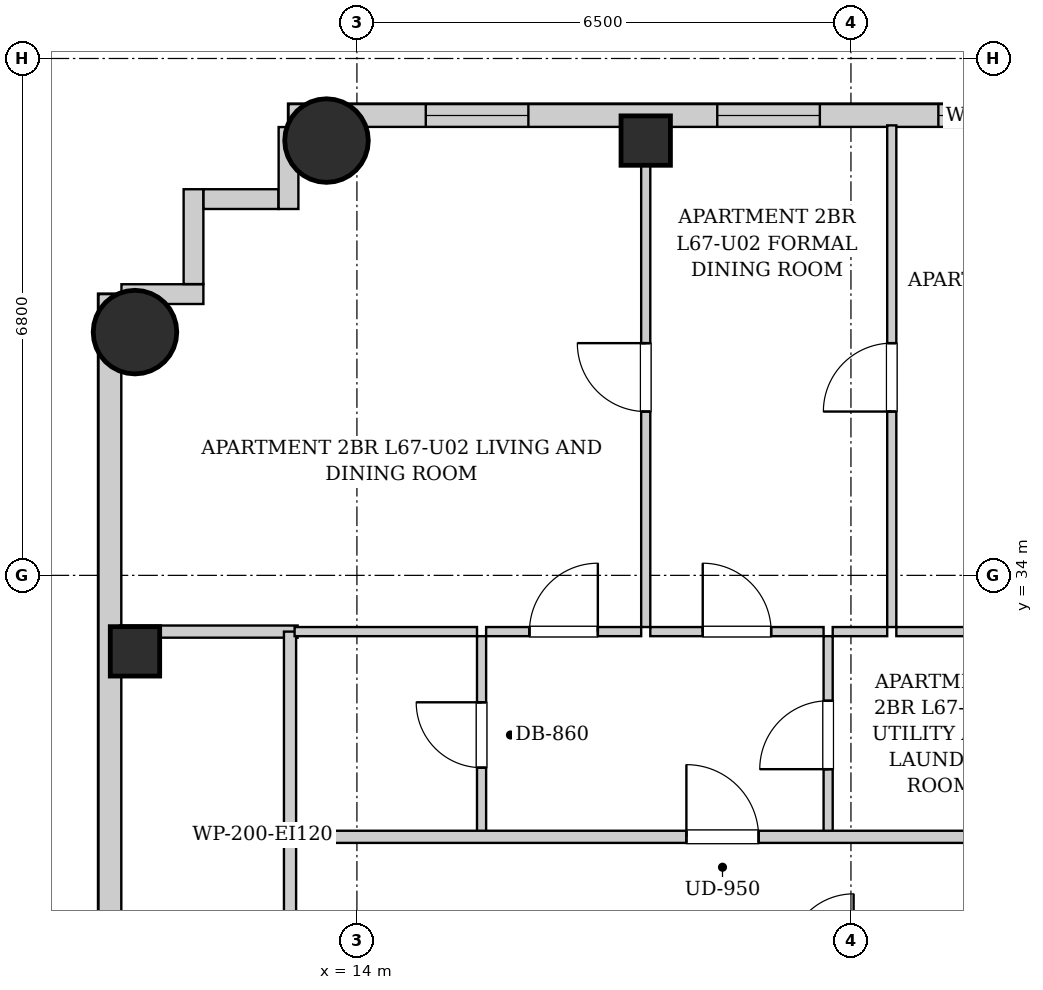
"""IFC4 building model, lengths in metres.
Left out: names, types, materials, properties, quantities, classifications, styles, units other than length and angle.
Written with IfcOpenShell. Run it as: python <this file> out.ifc"""

import sys

from ifc_helpers import new_model, si_unit, direction, frame, frame_2d, origin, origin_2d, place, context, subcontext, project, spatial, rectangle, circle, extrude, element, fill, save


model = new_model("IFC4")
c1 = context("Model", 3, precision=1e-05, world=origin(), true_north=direction((0.0, 1.0)))
c2 = subcontext(c1, "Body", "Model", "MODEL_VIEW")
j1 = project(units=[si_unit("LENGTHUNIT", "METRE"), si_unit("PLANEANGLEUNIT", "RADIAN")], contexts=[c1])
p1 = place(None, origin())
s1 = spatial("IfcSite", under=j1, at=p1, CompositionType="ELEMENT")
p2 = place(p1, origin())
s2 = spatial("IfcBuilding", under=s1, at=p2, CompositionType="ELEMENT")
p3 = place(p2, frame((0.0, 0.0, 230.9)))
s3 = spatial("IfcBuildingStorey", under=s2, at=p3, CompositionType="ELEMENT", Elevation=230.9)
p4 = place(p3, frame((13.6, 39.72, 0.0), z_axis=(0.0, 0.0, 1.0), x_axis=(1.0, 0.0, 0.0)))
e1 = element("IfcColumn", 1, at=p4, inside=s3, PredefinedType="COLUMN", context=c2, shape_type="SweptSolid", body=[
    extrude(circle(Radius=0.55, at=origin_2d()), origin(), (0.0, 0.0, 1.0), 3.4),
])
for number, where, z_axis, x_axis in (
    (2, (17.8, 39.72, 0.0), (0.0, 0.0, 1.0), (1.0, 0.0, 0.0)),
    (3, (11.08, 33.0, 0.0), (0.0, 0.0, 1.0), (1.0, 0.0, 0.0)),
):
    element("IfcColumn", number, at=place(p3, frame(where, z_axis=z_axis, x_axis=x_axis)), inside=s3, PredefinedType="COLUMN", context=c2, shape_type="SweptSolid", body=[
        extrude(rectangle(XDim=0.65, YDim=0.65, at=origin_2d()), origin(), (0.0, 0.0, 1.0), 3.4),
    ])
p5 = place(p3, frame((11.08, 37.2, 0.0), z_axis=(0.0, 0.0, 1.0), x_axis=(1.0, 0.0, 0.0)))
e4 = element("IfcColumn", 4, at=p5, inside=s3, PredefinedType="COLUMN", context=c2, shape_type="SweptSolid", body=[
    extrude(circle(Radius=0.55, at=origin_2d()), origin(), (0.0, 0.0, 1.0), 3.4),
])
p6 = place(p3, frame((13.1, 40.05, 0.0), z_axis=(0.0, 0.0, 1.0), x_axis=(1.0, 0.0, 0.0)))
e5 = element("IfcWall", 5, at=p6, inside=s3, PredefinedType="SOLIDWALL", context=c2, shape_type="SweptSolid", body=[
    extrude(rectangle(XDim=18.8, YDim=0.3, at=frame_2d((9.4, 0.0))), origin(), (0.0, 0.0, 1.0), 3.14),
])
p7 = place(p6, frame((1.806, 0.0, 0.55)))
e6 = element("IfcOpeningElement", 6, at=p7, cuts=e5, PredefinedType="OPENING", context=c2, shape_type="SweptSolid", body=[
    extrude(rectangle(XDim=1.35, YDim=1.2, at=frame_2d((0.675, 0.6))), frame((0.0, 0.16, 0.0), z_axis=(0.0, -1.0, 0.0), x_axis=(1.0, 0.0, 0.0)), (0.0, 0.0, 1.0), 0.32),
])
p8 = place(p6, frame((5.641, 0.0, 0.55)))
e7 = element("IfcOpeningElement", 7, at=p8, cuts=e5, PredefinedType="OPENING", context=c2, shape_type="SweptSolid", body=[
    extrude(rectangle(XDim=1.35, YDim=1.2, at=frame_2d((0.675, 0.6))), frame((0.0, 0.16, 0.0), z_axis=(0.0, -1.0, 0.0), x_axis=(1.0, 0.0, 0.0)), (0.0, 0.0, 1.0), 0.32),
])
p9 = place(p6, frame((8.55, 0.0, 0.55)))
e8 = element("IfcOpeningElement", 8, at=p9, cuts=e5, PredefinedType="OPENING", context=c2, shape_type="SweptSolid", body=[
    extrude(rectangle(XDim=0.85, YDim=1.2, at=frame_2d((0.425, 0.6))), frame((0.0, 0.16, 0.0), z_axis=(0.0, -1.0, 0.0), x_axis=(1.0, 0.0, 0.0)), (0.0, 0.0, 1.0), 0.32),
])
p10 = place(p6, frame((14.4, 0.0, 0.55)))
e9 = element("IfcOpeningElement", 9, at=p10, cuts=e5, PredefinedType="OPENING", context=c2, shape_type="SweptSolid", body=[
    extrude(rectangle(XDim=1.35, YDim=1.2, at=frame_2d((0.675, 0.6))), frame((0.0, 0.16, 0.0), z_axis=(0.0, -1.0, 0.0), x_axis=(1.0, 0.0, 0.0)), (0.0, 0.0, 1.0), 0.32),
])
p11 = place(p3, frame((10.75, 6.3, 0.0), z_axis=(0.0, 0.0, 1.0), x_axis=(0.0, 1.0, 0.0)))
e10 = element("IfcWall", 10, at=p11, inside=s3, PredefinedType="SOLIDWALL", context=c2, shape_type="SweptSolid", body=[
    extrude(rectangle(XDim=31.4, YDim=0.3, at=frame_2d((15.7, 0.0))), origin(), (0.0, 0.0, 1.0), 3.14),
])
p12 = place(p11, frame((1.653, 0.0, 0.55)))
e11 = element("IfcOpeningElement", 11, at=p12, cuts=e10, PredefinedType="OPENING", context=c2, shape_type="SweptSolid", body=[
    extrude(rectangle(XDim=1.35, YDim=1.2, at=frame_2d((0.675, 0.6))), frame((0.0, 0.16, 0.0), z_axis=(0.0, -1.0, 0.0), x_axis=(1.0, 0.0, 0.0)), (0.0, 0.0, 1.0), 0.32),
])
p13 = place(p11, frame((10.367, 0.0, 0.55)))
e12 = element("IfcOpeningElement", 12, at=p13, cuts=e10, PredefinedType="OPENING", context=c2, shape_type="SweptSolid", body=[
    extrude(rectangle(XDim=1.35, YDim=1.2, at=frame_2d((0.675, 0.6))), frame((0.0, 0.16, 0.0), z_axis=(0.0, -1.0, 0.0), x_axis=(1.0, 0.0, 0.0)), (0.0, 0.0, 1.0), 0.32),
])
p14 = place(p11, frame((19.683, 0.0, 0.55)))
e13 = element("IfcOpeningElement", 13, at=p14, cuts=e10, PredefinedType="OPENING", context=c2, shape_type="SweptSolid", body=[
    extrude(rectangle(XDim=1.35, YDim=1.2, at=frame_2d((0.675, 0.6))), frame((0.0, 0.16, 0.0), z_axis=(0.0, -1.0, 0.0), x_axis=(1.0, 0.0, 0.0)), (0.0, 0.0, 1.0), 0.32),
])
p15 = place(p3, frame((10.902, 37.7, 0.0), z_axis=(0.0, 0.0, 1.0), x_axis=(1.0, 0.0, 0.0)))
e14 = element("IfcWall", 14, at=p15, inside=s3, PredefinedType="SOLIDWALL", context=c2, shape_type="SweptSolid", body=[
    extrude(rectangle(XDim=1.078, YDim=0.26, at=frame_2d((0.539, 0.0))), origin(), (0.0, 0.0, 1.0), 3.14),
])
p16 = place(p3, frame((11.85, 37.832, 0.0), z_axis=(0.0, 0.0, 1.0), x_axis=(0.0, 1.0, 0.0)))
e15 = element("IfcWall", 15, at=p16, inside=s3, PredefinedType="SOLIDWALL", context=c2, shape_type="SweptSolid", body=[
    extrude(rectangle(XDim=1.248, YDim=0.26, at=frame_2d((0.624, 0.0))), origin(), (0.0, 0.0, 1.0), 3.14),
])
p17 = place(p3, frame((11.982, 38.95, 0.0), z_axis=(0.0, 0.0, 1.0), x_axis=(1.0, 0.0, 0.0)))
e16 = element("IfcWall", 16, at=p17, inside=s3, PredefinedType="SOLIDWALL", context=c2, shape_type="SweptSolid", body=[
    extrude(rectangle(XDim=0.986, YDim=0.26, at=frame_2d((0.493, 0.0))), origin(), (0.0, 0.0, 1.0), 3.14),
])
p18 = place(p3, frame((13.1, 38.82, 0.0), z_axis=(0.0, 0.0, 1.0), x_axis=(0.0, 1.0, 0.0)))
e17 = element("IfcWall", 17, at=p18, inside=s3, PredefinedType="SOLIDWALL", context=c2, shape_type="SweptSolid", body=[
    extrude(rectangle(XDim=1.078, YDim=0.26, at=frame_2d((0.539, 0.0))), origin(), (0.0, 0.0, 1.0), 3.14),
])
p19 = place(p3, frame((13.12, 28.98, 0.0), z_axis=(0.0, 0.0, 1.0), x_axis=(0.0, 1.0, 0.0)))
e18 = element("IfcWall", 18, at=p19, inside=s3, PredefinedType="PARTITIONING", context=c2, shape_type="SweptSolid", body=[
    extrude(rectangle(XDim=1.58, YDim=0.16, at=frame_2d((0.79, 0.0))), origin(), (0.0, 0.0, 1.0), 3.14),
])
p20 = place(p3, frame((10.88, 33.26, 0.0), z_axis=(0.0, 0.0, 1.0), x_axis=(1.0, 0.0, 0.0)))
e19 = element("IfcWall", 19, at=p20, inside=s3, PredefinedType="PARTITIONING", context=c2, shape_type="SweptSolid", body=[
    extrude(rectangle(XDim=2.34, YDim=0.16, at=frame_2d((1.17, 0.0))), origin(), (0.0, 0.0, 1.0), 3.14),
])
p21 = place(p3, frame((13.12, 30.6, 0.0), z_axis=(0.0, 0.0, 1.0), x_axis=(0.0, 1.0, 0.0)))
e20 = element("IfcWall", 20, at=p21, inside=s3, PredefinedType="PARTITIONING", context=c2, shape_type="SweptSolid", body=[
    extrude(rectangle(XDim=2.66, YDim=0.16, at=frame_2d((1.33, 0.0))), origin(), (0.0, 0.0, 1.0), 3.14),
])
p22 = place(p3, frame((15.64, 30.6, 0.0), z_axis=(0.0, 0.0, 1.0), x_axis=(0.0, 1.0, 0.0)))
e21 = element("IfcWall", 21, at=p22, inside=s3, PredefinedType="PARTITIONING", context=c2, shape_type="SweptSolid", body=[
    extrude(rectangle(XDim=2.6, YDim=0.12, at=frame_2d((1.3, 0.0))), origin(), (0.0, 0.0, 1.0), 3.14),
])
p23 = place(p22, frame((0.87, 0.0, 0.0)))
e22 = element("IfcOpeningElement", 22, at=p23, cuts=e21, PredefinedType="OPENING", context=c2, shape_type="SweptSolid", body=[
    extrude(rectangle(XDim=0.86, YDim=2.05, at=frame_2d((0.43, 1.025))), frame((0.0, 0.07, 0.0), z_axis=(0.0, -1.0, 0.0), x_axis=(1.0, 0.0, 0.0)), (0.0, 0.0, 1.0), 0.14),
])
p24 = place(p3, frame((13.18, 33.26, 0.0), z_axis=(0.0, 0.0, 1.0), x_axis=(1.0, 0.0, 0.0)))
e23 = element("IfcWall", 23, at=p24, inside=s3, PredefinedType="PARTITIONING", context=c2, shape_type="SweptSolid", body=[
    extrude(rectangle(XDim=2.4, YDim=0.12, at=frame_2d((1.2, 0.0))), origin(), (0.0, 0.0, 1.0), 3.14),
])
p25 = place(p3, frame((20.2, 30.6, 0.0), z_axis=(0.0, 0.0, 1.0), x_axis=(0.0, 1.0, 0.0)))
e24 = element("IfcWall", 24, at=p25, inside=s3, PredefinedType="PARTITIONING", context=c2, shape_type="SweptSolid", body=[
    extrude(rectangle(XDim=2.6, YDim=0.12, at=frame_2d((1.3, 0.0))), origin(), (0.0, 0.0, 1.0), 3.14),
])
p26 = place(p25, frame((0.85, 0.0, 0.0)))
e25 = element("IfcOpeningElement", 25, at=p26, cuts=e24, PredefinedType="OPENING", context=c2, shape_type="SweptSolid", body=[
    extrude(rectangle(XDim=0.9, YDim=2.05, at=frame_2d((0.45, 1.025))), frame((0.0, 0.07, 0.0), z_axis=(0.0, -1.0, 0.0), x_axis=(1.0, 0.0, 0.0)), (0.0, 0.0, 1.0), 0.14),
])
p27 = place(p3, frame((15.7, 33.26, 0.0), z_axis=(0.0, 0.0, 1.0), x_axis=(1.0, 0.0, 0.0)))
e26 = element("IfcWall", 26, at=p27, inside=s3, PredefinedType="PARTITIONING", context=c2, shape_type="SweptSolid", body=[
    extrude(rectangle(XDim=2.04, YDim=0.12, at=frame_2d((1.02, 0.0))), origin(), (0.0, 0.0, 1.0), 3.14),
])
p28 = place(p27, frame((0.57, 0.0, 0.0)))
e27 = element("IfcOpeningElement", 27, at=p28, cuts=e26, PredefinedType="OPENING", context=c2, shape_type="SweptSolid", body=[
    extrude(rectangle(XDim=0.9, YDim=2.05, at=frame_2d((0.45, 1.025))), frame((0.0, 0.07, 0.0), z_axis=(0.0, -1.0, 0.0), x_axis=(1.0, 0.0, 0.0)), (0.0, 0.0, 1.0), 0.14),
])
p29 = place(p3, frame((17.86, 33.26, 0.0), z_axis=(0.0, 0.0, 1.0), x_axis=(1.0, 0.0, 0.0)))
e28 = element("IfcWall", 28, at=p29, inside=s3, PredefinedType="PARTITIONING", context=c2, shape_type="SweptSolid", body=[
    extrude(rectangle(XDim=2.28, YDim=0.12, at=frame_2d((1.14, 0.0))), origin(), (0.0, 0.0, 1.0), 3.14),
])
p30 = place(p29, frame((0.69, 0.0, 0.0)))
e29 = element("IfcOpeningElement", 29, at=p30, cuts=e28, PredefinedType="OPENING", context=c2, shape_type="SweptSolid", body=[
    extrude(rectangle(XDim=0.9, YDim=2.05, at=frame_2d((0.45, 1.025))), frame((0.0, 0.07, 0.0), z_axis=(0.0, -1.0, 0.0), x_axis=(1.0, 0.0, 0.0)), (0.0, 0.0, 1.0), 0.14),
])
p31 = place(p3, frame((20.26, 33.26, 0.0), z_axis=(0.0, 0.0, 1.0), x_axis=(1.0, 0.0, 0.0)))
e30 = element("IfcWall", 30, at=p31, inside=s3, PredefinedType="PARTITIONING", context=c2, shape_type="SweptSolid", body=[
    extrude(rectangle(XDim=0.717, YDim=0.12, at=frame_2d((0.358, 0.0))), origin(), (0.0, 0.0, 1.0), 3.14),
])
p32 = place(p3, frame((21.097, 33.26, 0.0), z_axis=(0.0, 0.0, 1.0), x_axis=(1.0, 0.0, 0.0)))
e31 = element("IfcWall", 31, at=p32, inside=s3, PredefinedType="PARTITIONING", context=c2, shape_type="SweptSolid", body=[
    extrude(rectangle(XDim=2.763, YDim=0.12, at=frame_2d((1.382, 0.0))), origin(), (0.0, 0.0, 1.0), 3.14),
])
p33 = place(p32, frame((0.931, 0.0, 0.0)))
e32 = element("IfcOpeningElement", 32, at=p33, cuts=e31, PredefinedType="OPENING", context=c2, shape_type="SweptSolid", body=[
    extrude(rectangle(XDim=0.9, YDim=2.05, at=frame_2d((0.45, 1.025))), frame((0.0, 0.07, 0.0), z_axis=(0.0, -1.0, 0.0), x_axis=(1.0, 0.0, 0.0)), (0.0, 0.0, 1.0), 0.14),
])
p34 = place(p3, frame((17.8, 33.32, 0.0), z_axis=(0.0, 0.0, 1.0), x_axis=(0.0, 1.0, 0.0)))
e33 = element("IfcWall", 33, at=p34, inside=s3, PredefinedType="PARTITIONING", context=c2, shape_type="SweptSolid", body=[
    extrude(rectangle(XDim=6.6, YDim=0.12, at=frame_2d((3.3, 0.0))), origin(), (0.0, 0.0, 1.0), 2.668),
])
p35 = place(p34, frame((2.835, 0.0, 0.0)))
e34 = element("IfcOpeningElement", 34, at=p35, cuts=e33, PredefinedType="OPENING", context=c2, shape_type="SweptSolid", body=[
    extrude(rectangle(XDim=0.9, YDim=2.05, at=frame_2d((0.45, 1.025))), frame((0.0, 0.07, 0.0), z_axis=(0.0, -1.0, 0.0), x_axis=(1.0, 0.0, 0.0)), (0.0, 0.0, 1.0), 0.14),
])
p36 = place(p3, frame((21.037, 33.32, 0.0), z_axis=(0.0, 0.0, 1.0), x_axis=(0.0, 1.0, 0.0)))
e35 = element("IfcWall", 35, at=p36, inside=s3, PredefinedType="PARTITIONING", context=c2, shape_type="SweptSolid", body=[
    extrude(rectangle(XDim=6.6, YDim=0.12, at=frame_2d((3.3, 0.0))), origin(), (0.0, 0.0, 1.0), 3.14),
])
p37 = place(p36, frame((2.835, 0.0, 0.0)))
e36 = element("IfcOpeningElement", 36, at=p37, cuts=e35, PredefinedType="OPENING", context=c2, shape_type="SweptSolid", body=[
    extrude(rectangle(XDim=0.9, YDim=2.05, at=frame_2d((0.45, 1.025))), frame((0.0, 0.07, 0.0), z_axis=(0.0, -1.0, 0.0), x_axis=(1.0, 0.0, 0.0)), (0.0, 0.0, 1.0), 0.14),
])
p38 = place(p3, frame((13.15, 30.56, 0.0), z_axis=(0.0, 0.0, 1.0), x_axis=(1.0, 0.0, 0.0)))
e37 = element("IfcWall", 37, at=p38, inside=s3, PredefinedType="PARTITIONING", context=c2, shape_type="SweptSolid", body=[
    extrude(rectangle(XDim=24.6, YDim=0.16, at=frame_2d((12.3, 0.0))), origin(), (0.0, 0.0, 1.0), 3.14),
])
p39 = place(p38, frame((5.185, 0.0, 0.0)))
e38 = element("IfcOpeningElement", 38, at=p39, cuts=e37, PredefinedType="OPENING", context=c2, shape_type="SweptSolid", body=[
    extrude(rectangle(XDim=0.95, YDim=2.1, at=frame_2d((0.475, 1.05))), frame((0.0, 0.09, 0.0), z_axis=(0.0, -1.0, 0.0), x_axis=(1.0, 0.0, 0.0)), (0.0, 0.0, 1.0), 0.18),
])
p40 = place(p38, frame((21.55, 0.0, 0.0)))
e39 = element("IfcOpeningElement", 39, at=p40, cuts=e37, PredefinedType="OPENING", context=c2, shape_type="SweptSolid", body=[
    extrude(rectangle(XDim=0.95, YDim=2.1, at=frame_2d((0.475, 1.05))), frame((0.0, 0.09, 0.0), z_axis=(0.0, -1.0, 0.0), x_axis=(1.0, 0.0, 0.0)), (0.0, 0.0, 1.0), 0.18),
])
p41 = place(p23, origin())
e40 = element("IfcDoor", 40, at=p41, inside=s3, OperationType="SINGLE_SWING_RIGHT", PredefinedType="DOOR", context=c2, shape_type="SweptSolid", body=[
    extrude(rectangle(XDim=0.86, YDim=2.05, at=frame_2d((0.43, 1.025))), frame((0.0, 0.025, 0.0), z_axis=(0.0, -1.0, 0.0), x_axis=(1.0, 0.0, 0.0)), (0.0, 0.0, 1.0), 0.05),
])
fill(e22, e40)
p42 = place(p26, origin())
e41 = element("IfcDoor", 41, at=p42, inside=s3, OperationType="SINGLE_SWING_LEFT", PredefinedType="DOOR", context=c2, shape_type="SweptSolid", body=[
    extrude(rectangle(XDim=0.9, YDim=2.05, at=frame_2d((0.45, 1.025))), frame((0.0, 0.025, 0.0), z_axis=(0.0, -1.0, 0.0), x_axis=(1.0, 0.0, 0.0)), (0.0, 0.0, 1.0), 0.05),
])
fill(e25, e41)
p43 = place(p28, origin())
e42 = element("IfcDoor", 42, at=p43, inside=s3, OperationType="SINGLE_SWING_RIGHT", PredefinedType="DOOR", context=c2, shape_type="SweptSolid", body=[
    extrude(rectangle(XDim=0.9, YDim=2.05, at=frame_2d((0.45, 1.025))), frame((0.0, 0.025, 0.0), z_axis=(0.0, -1.0, 0.0), x_axis=(1.0, 0.0, 0.0)), (0.0, 0.0, 1.0), 0.05),
])
fill(e27, e42)
p44 = place(p30, origin())
e43 = element("IfcDoor", 43, at=p44, inside=s3, OperationType="SINGLE_SWING_LEFT", PredefinedType="DOOR", context=c2, shape_type="SweptSolid", body=[
    extrude(rectangle(XDim=0.9, YDim=2.05, at=frame_2d((0.45, 1.025))), frame((0.0, 0.025, 0.0), z_axis=(0.0, -1.0, 0.0), x_axis=(1.0, 0.0, 0.0)), (0.0, 0.0, 1.0), 0.05),
])
fill(e29, e43)
p45 = place(p35, origin())
e44 = element("IfcDoor", 44, at=p45, inside=s3, OperationType="SINGLE_SWING_RIGHT", PredefinedType="DOOR", context=c2, shape_type="SweptSolid", body=[
    extrude(rectangle(XDim=0.9, YDim=2.05, at=frame_2d((0.45, 1.025))), frame((0.0, 0.025, 0.0), z_axis=(0.0, -1.0, 0.0), x_axis=(1.0, 0.0, 0.0)), (0.0, 0.0, 1.0), 0.05),
])
fill(e34, e44)
p46 = place(p37, origin())
e45 = element("IfcDoor", 45, at=p46, inside=s3, OperationType="SINGLE_SWING_LEFT", PredefinedType="DOOR", context=c2, shape_type="SweptSolid", body=[
    extrude(rectangle(XDim=0.9, YDim=2.05, at=frame_2d((0.45, 1.025))), frame((0.0, 0.025, 0.0), z_axis=(0.0, -1.0, 0.0), x_axis=(1.0, 0.0, 0.0)), (0.0, 0.0, 1.0), 0.05),
])
fill(e36, e45)
p47 = place(p39, origin())
e46 = element("IfcDoor", 46, at=p47, inside=s3, OperationType="SINGLE_SWING_LEFT", PredefinedType="DOOR", context=c2, shape_type="SweptSolid", body=[
    extrude(rectangle(XDim=0.95, YDim=2.1, at=frame_2d((0.475, 1.05))), frame((0.0, 0.025, 0.0), z_axis=(0.0, -1.0, 0.0), x_axis=(1.0, 0.0, 0.0)), (0.0, 0.0, 1.0), 0.05),
])
fill(e38, e46)
p48 = place(p7, origin())
e47 = element("IfcWindow", 47, at=p48, inside=s3, PartitioningType="SINGLE_PANEL", PredefinedType="WINDOW", context=c2, shape_type="SweptSolid", body=[
    extrude(rectangle(XDim=1.35, YDim=1.2, at=frame_2d((0.675, 0.6))), frame((0.0, 0.03, 0.0), z_axis=(0.0, -1.0, 0.0), x_axis=(1.0, 0.0, 0.0)), (0.0, 0.0, 1.0), 0.06),
])
fill(e6, e47)
p49 = place(p8, origin())
e48 = element("IfcWindow", 48, at=p49, inside=s3, PartitioningType="SINGLE_PANEL", PredefinedType="WINDOW", context=c2, shape_type="SweptSolid", body=[
    extrude(rectangle(XDim=1.35, YDim=1.2, at=frame_2d((0.675, 0.6))), frame((0.0, 0.03, 0.0), z_axis=(0.0, -1.0, 0.0), x_axis=(1.0, 0.0, 0.0)), (0.0, 0.0, 1.0), 0.06),
])
fill(e7, e48)
p50 = place(p9, origin())
e49 = element("IfcWindow", 49, at=p50, inside=s3, PartitioningType="SINGLE_PANEL", PredefinedType="WINDOW", context=c2, shape_type="SweptSolid", body=[
    extrude(rectangle(XDim=0.85, YDim=1.2, at=frame_2d((0.425, 0.6))), frame((0.0, 0.03, 0.0), z_axis=(0.0, -1.0, 0.0), x_axis=(1.0, 0.0, 0.0)), (0.0, 0.0, 1.0), 0.06),
])
fill(e8, e49)
save(model, sys.argv[1])
